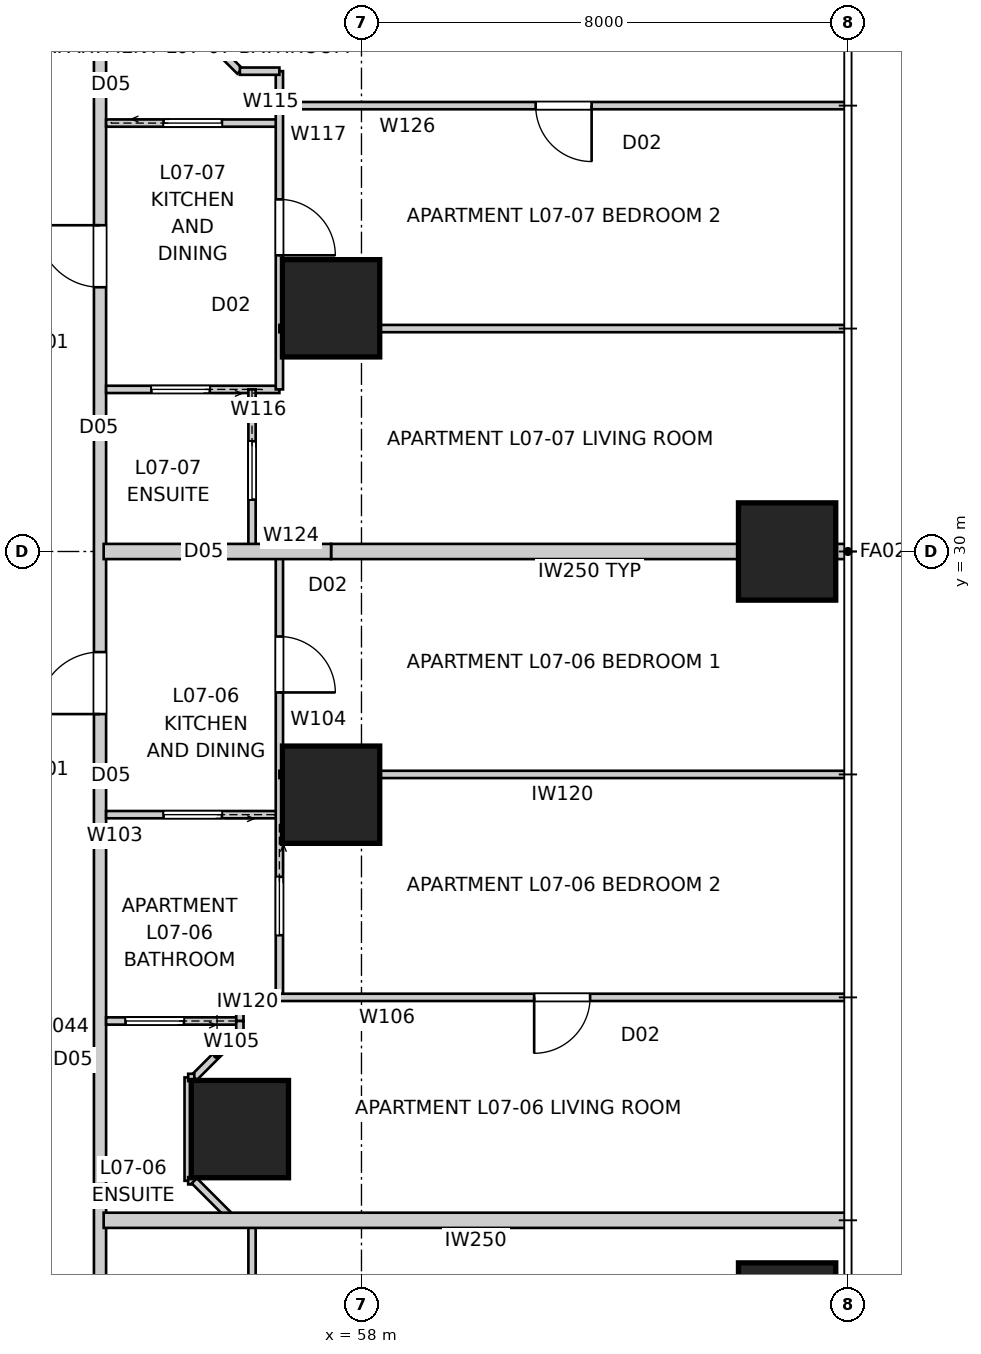
"""IFC4 building model, lengths in metres.
Left out: names, types, materials, properties, quantities, classifications, styles, units other than length and angle.
Written with IfcOpenShell. Run it as: python <this file> out.ifc"""

import sys

from ifc_helpers import new_model, si_unit, direction, frame, frame_2d, origin, origin_2d, place, context, subcontext, project, spatial, rectangle, extrude, element, fill, save


model = new_model("IFC4")
c1 = context("Model", 3, precision=1e-05, world=origin(), true_north=direction((0.0, 1.0)))
c2 = subcontext(c1, "Body", "Model", "MODEL_VIEW")
j1 = project(units=[si_unit("LENGTHUNIT", "METRE"), si_unit("PLANEANGLEUNIT", "RADIAN")], contexts=[c1])
p1 = place(None, origin())
s1 = spatial("IfcSite", under=j1, at=p1, CompositionType="ELEMENT")
p2 = place(p1, origin())
s2 = spatial("IfcBuilding", under=s1, at=p2, CompositionType="ELEMENT")
p3 = place(p2, frame((0.0, 0.0, 28.6)))
s3 = spatial("IfcBuildingStorey", under=s2, at=p3, CompositionType="ELEMENT", Elevation=28.6)
for number, where, z_axis, x_axis in (
    (1, (65.0, 17.5, 0.0), (0.0, 0.0, 1.0), (1.0, 0.0, 0.0)),
    (2, (65.0, 30.0, 0.0), (0.0, 0.0, 1.0), (1.0, 0.0, 0.0)),
    (3, (57.5, 26.0, 0.0), (0.0, 0.0, 1.0), (1.0, 0.0, 0.0)),
    (4, (57.5, 34.0, 0.0), (0.0, 0.0, 1.0), (1.0, 0.0, 0.0)),
    (5, (56.0, 20.5, 0.0), (0.0, 0.0, 1.0), (1.0, 0.0, 0.0)),
):
    element("IfcColumn", number, at=place(p3, frame(where, z_axis=z_axis, x_axis=x_axis)), inside=s3, PredefinedType="COLUMN", context=c2, shape_type="SweptSolid", body=[
        extrude(rectangle(XDim=1.6, YDim=1.6, at=origin_2d()), origin(), (0.0, 0.0, 1.0), 3.4),
    ])
p4 = place(p3, frame((53.7, 13.7, 0.0), z_axis=(0.0, 0.0, 1.0), x_axis=(0.0, 1.0, 0.0)))
e6 = element("IfcWall", 6, at=p4, inside=s3, PredefinedType="PARTITIONING", context=c2, shape_type="SweptSolid", body=[
    extrude(rectangle(XDim=32.6, YDim=0.2, at=frame_2d((16.3, 0.0))), origin(), (0.0, 0.0, 1.0), 3.25),
])
p5 = place(p4, frame((2.315, 0.0, 0.0)))
e7 = element("IfcOpeningElement", 7, at=p5, cuts=e6, PredefinedType="OPENING", context=c2, shape_type="SweptSolid", body=[
    extrude(rectangle(XDim=1.02, YDim=2.34, at=frame_2d((0.51, 1.17))), frame((0.0, 0.11, 0.0), z_axis=(0.0, -1.0, 0.0), x_axis=(1.0, 0.0, 0.0)), (0.0, 0.0, 1.0), 0.22),
])
p6 = place(p4, frame((29.265, 0.0, 0.0)))
e8 = element("IfcOpeningElement", 8, at=p6, cuts=e6, PredefinedType="OPENING", context=c2, shape_type="SweptSolid", body=[
    extrude(rectangle(XDim=1.02, YDim=2.34, at=frame_2d((0.51, 1.17))), frame((0.0, 0.11, 0.0), z_axis=(0.0, -1.0, 0.0), x_axis=(1.0, 0.0, 0.0)), (0.0, 0.0, 1.0), 0.22),
])
p7 = place(p4, frame((20.646, 0.0, 0.0)))
e9 = element("IfcOpeningElement", 9, at=p7, cuts=e6, PredefinedType="OPENING", context=c2, shape_type="SweptSolid", body=[
    extrude(rectangle(XDim=1.02, YDim=2.34, at=frame_2d((0.51, 1.17))), frame((0.0, 0.11, 0.0), z_axis=(0.0, -1.0, 0.0), x_axis=(1.0, 0.0, 0.0)), (0.0, 0.0, 1.0), 0.22),
])
p8 = place(p4, frame((13.626, 0.0, 0.0)))
e10 = element("IfcOpeningElement", 10, at=p8, cuts=e6, PredefinedType="OPENING", context=c2, shape_type="SweptSolid", body=[
    extrude(rectangle(XDim=1.02, YDim=2.34, at=frame_2d((0.51, 1.17))), frame((0.0, 0.11, 0.0), z_axis=(0.0, -1.0, 0.0), x_axis=(1.0, 0.0, 0.0)), (0.0, 0.0, 1.0), 0.22),
])
p9 = place(p3, frame((66.0, 19.0, 0.0), z_axis=(0.0, 0.0, 1.0), x_axis=(-1.0, 0.0, 0.0)))
e11 = element("IfcWall", 11, at=p9, inside=s3, PredefinedType="PARTITIONING", context=c2, shape_type="SweptSolid", body=[
    extrude(rectangle(XDim=12.24, YDim=0.25, at=frame_2d((6.12, 0.0))), origin(), (0.0, 0.0, 1.0), 3.25),
])
p10 = place(p3, frame((66.0, 30.0, 0.0), z_axis=(0.0, 0.0, 1.0), x_axis=(-1.0, 0.0, 0.0)))
e12 = element("IfcWall", 12, at=p10, inside=s3, PredefinedType="PARTITIONING", context=c2, shape_type="SweptSolid", body=[
    extrude(rectangle(XDim=8.5, YDim=0.25, at=frame_2d((4.25, 0.0))), origin(), (0.0, 0.0, 1.0), 3.25),
])
p11 = place(p3, frame((57.5, 30.0, 0.0), z_axis=(0.0, 0.0, 1.0), x_axis=(-1.0, 0.0, 0.0)))
e13 = element("IfcWall", 13, at=p11, inside=s3, PredefinedType="PARTITIONING", context=c2, shape_type="SweptSolid", body=[
    extrude(rectangle(XDim=3.74, YDim=0.25, at=frame_2d((1.87, 0.0))), origin(), (0.0, 0.0, 1.0), 2.796),
])
p12 = place(p3, frame((56.2, 19.0, 0.0), z_axis=(0.0, 0.0, 1.0), x_axis=(0.0, -1.0, 0.0)))
e14 = element("IfcWall", 14, at=p12, inside=s3, PredefinedType="PARTITIONING", context=c2, shape_type="SweptSolid", body=[
    extrude(rectangle(XDim=7.8, YDim=0.12, at=frame_2d((3.9, 0.0))), origin(), (0.0, 0.0, 1.0), 3.25),
])
p13 = place(p12, frame((2.24, 0.0, 0.0)))
e15 = element("IfcOpeningElement", 15, at=p13, cuts=e14, PredefinedType="OPENING", context=c2, shape_type="SweptSolid", body=[
    extrude(rectangle(XDim=0.92, YDim=2.34, at=frame_2d((0.46, 1.17))), frame((0.0, 0.07, 0.0), z_axis=(0.0, -1.0, 0.0), x_axis=(1.0, 0.0, 0.0)), (0.0, 0.0, 1.0), 0.14),
])
p14 = place(p3, frame((56.65, 25.672, 0.0), z_axis=(0.0, 0.0, 1.0), x_axis=(-1.0, 0.0, 0.0)))
e16 = element("IfcWall", 16, at=p14, inside=s3, PredefinedType="PARTITIONING", context=c2, shape_type="SweptSolid", body=[
    extrude(rectangle(XDim=2.85, YDim=0.12, at=frame_2d((1.425, 0.0))), origin(), (0.0, 0.0, 1.0), 3.25),
])
p15 = place(p14, frame((0.945, 0.0, 0.0)))
e17 = element("IfcOpeningElement", 17, at=p15, cuts=e16, PredefinedType="OPENING", context=c2, shape_type="SweptSolid", body=[
    extrude(rectangle(XDim=0.96, YDim=2.1, at=frame_2d((0.48, 1.05))), frame((0.0, 0.07, 0.0), z_axis=(0.0, -1.0, 0.0), x_axis=(1.0, 0.0, 0.0)), (0.0, 0.0, 1.0), 0.14),
])
p16 = place(p3, frame((56.65, 30.0, 0.0), z_axis=(0.0, 0.0, 1.0), x_axis=(0.0, -1.0, 0.0)))
e18 = element("IfcWall", 18, at=p16, inside=s3, PredefinedType="PARTITIONING", context=c2, shape_type="SweptSolid", body=[
    extrude(rectangle(XDim=7.333, YDim=0.12, at=frame_2d((3.667, 0.0))), origin(), (0.0, 0.0, 1.0), 2.55),
])
p17 = place(p16, frame((1.398, 0.0, 0.0)))
e19 = element("IfcOpeningElement", 19, at=p17, cuts=e18, PredefinedType="OPENING", context=c2, shape_type="SweptSolid", body=[
    extrude(rectangle(XDim=0.92, YDim=2.34, at=frame_2d((0.46, 1.17))), frame((0.0, 0.07, 0.0), z_axis=(0.0, -1.0, 0.0), x_axis=(1.0, 0.0, 0.0)), (0.0, 0.0, 1.0), 0.14),
])
p18 = place(p16, frame((5.351, 0.0, 0.0)))
e20 = element("IfcOpeningElement", 20, at=p18, cuts=e18, PredefinedType="OPENING", context=c2, shape_type="SweptSolid", body=[
    extrude(rectangle(XDim=0.96, YDim=2.1, at=frame_2d((0.48, 1.05))), frame((0.0, 0.07, 0.0), z_axis=(0.0, -1.0, 0.0), x_axis=(1.0, 0.0, 0.0)), (0.0, 0.0, 1.0), 0.14),
])
p19 = place(p3, frame((56.0, 22.278, 0.0), z_axis=(0.0, 0.0, 1.0), x_axis=(-1.0, 0.0, 0.0)))
e21 = element("IfcWall", 21, at=p19, inside=s3, PredefinedType="PARTITIONING", context=c2, shape_type="SweptSolid", body=[
    extrude(rectangle(XDim=2.2, YDim=0.12, at=frame_2d((1.1, 0.0))), origin(), (0.0, 0.0, 1.0), 3.25),
])
p20 = place(p19, frame((0.92, 0.0, 0.0)))
e22 = element("IfcOpeningElement", 22, at=p20, cuts=e21, PredefinedType="OPENING", context=c2, shape_type="SweptSolid", body=[
    extrude(rectangle(XDim=0.96, YDim=2.1, at=frame_2d((0.48, 1.05))), frame((0.0, 0.07, 0.0), z_axis=(0.0, -1.0, 0.0), x_axis=(1.0, 0.0, 0.0)), (0.0, 0.0, 1.0), 0.14),
])
p21 = place(p3, frame((65.96, 22.667, 0.0), z_axis=(0.0, 0.0, 1.0), x_axis=(-1.0, 0.0, 0.0)))
e23 = element("IfcWall", 23, at=p21, inside=s3, PredefinedType="PARTITIONING", context=c2, shape_type="SweptSolid", body=[
    extrude(rectangle(XDim=9.96, YDim=0.12, at=frame_2d((4.98, 0.0))), origin(), (0.0, 0.0, 1.0), 3.25),
])
p22 = place(p21, frame((4.2, 0.0, 0.0)))
e24 = element("IfcOpeningElement", 24, at=p22, cuts=e23, PredefinedType="OPENING", context=c2, shape_type="SweptSolid", body=[
    extrude(rectangle(XDim=0.92, YDim=2.34, at=frame_2d((0.46, 1.17))), frame((0.0, 0.07, 0.0), z_axis=(0.0, -1.0, 0.0), x_axis=(1.0, 0.0, 0.0)), (0.0, 0.0, 1.0), 0.14),
])
p23 = place(p3, frame((56.0, 22.667, 0.0), z_axis=(0.0, 0.0, 1.0), x_axis=(0.0, -1.0, 0.0)))
e25 = element("IfcWall", 25, at=p23, inside=s3, PredefinedType="PARTITIONING", context=c2, shape_type="SweptSolid", body=[
    extrude(rectangle(XDim=0.389, YDim=0.12, at=frame_2d((0.194, 0.0))), origin(), (0.0, 0.0, 1.0), 3.25),
])
p24 = place(p3, frame((56.0, 22.1, 0.0), z_axis=(0.0, 0.0, 1.0), x_axis=(-0.707106781187, -0.707106781187, 0.0)))
e26 = element("IfcWall", 26, at=p24, inside=s3, PredefinedType="PARTITIONING", context=c2, shape_type="SweptSolid", body=[
    extrude(rectangle(XDim=1.061, YDim=0.12, at=frame_2d((0.53, 0.0))), origin(), (0.0, 0.0, 1.0), 3.25),
])
p25 = place(p3, frame((55.15, 21.35, 0.0), z_axis=(0.0, 0.0, 1.0), x_axis=(0.0, -1.0, 0.0)))
e27 = element("IfcWall", 27, at=p25, inside=s3, PredefinedType="PARTITIONING", context=c2, shape_type="SweptSolid", body=[
    extrude(rectangle(XDim=1.7, YDim=0.12, at=frame_2d((0.85, 0.0))), origin(), (0.0, 0.0, 1.0), 3.25),
])
p26 = place(p3, frame((55.25, 19.65, 0.0), z_axis=(0.0, 0.0, 1.0), x_axis=(0.707106781187, -0.707106781187, 0.0)))
e28 = element("IfcWall", 28, at=p26, inside=s3, PredefinedType="PARTITIONING", context=c2, shape_type="SweptSolid", body=[
    extrude(rectangle(XDim=0.919, YDim=0.12, at=frame_2d((0.459, 0.0))), origin(), (0.0, 0.0, 1.0), 3.25),
])
p27 = place(p3, frame((65.96, 26.333, 0.0), z_axis=(0.0, 0.0, 1.0), x_axis=(-1.0, 0.0, 0.0)))
e29 = element("IfcWall", 29, at=p27, inside=s3, PredefinedType="PARTITIONING", context=c2, shape_type="SweptSolid", body=[
    extrude(rectangle(XDim=9.31, YDim=0.12, at=frame_2d((4.655, 0.0))), origin(), (0.0, 0.0, 1.0), 3.25),
])
p28 = place(p3, frame((53.8, 37.046, 0.0), z_axis=(0.0, 0.0, 1.0), x_axis=(1.0, 0.0, 0.0)))
e30 = element("IfcWall", 30, at=p28, inside=s3, PredefinedType="PARTITIONING", context=c2, shape_type="SweptSolid", body=[
    extrude(rectangle(XDim=2.85, YDim=0.12, at=frame_2d((1.425, 0.0))), origin(), (0.0, 0.0, 1.0), 3.25),
])
p29 = place(p28, frame((0.945, 0.0, 0.0)))
e31 = element("IfcOpeningElement", 31, at=p29, cuts=e30, PredefinedType="OPENING", context=c2, shape_type="SweptSolid", body=[
    extrude(rectangle(XDim=0.96, YDim=2.1, at=frame_2d((0.48, 1.05))), frame((0.0, 0.07, 0.0), z_axis=(0.0, -1.0, 0.0), x_axis=(1.0, 0.0, 0.0)), (0.0, 0.0, 1.0), 0.14),
])
p30 = place(p3, frame((56.65, 32.666, 0.0), z_axis=(0.0, 0.0, 1.0), x_axis=(-1.0, 0.0, 0.0)))
e32 = element("IfcWall", 32, at=p30, inside=s3, PredefinedType="PARTITIONING", context=c2, shape_type="SweptSolid", body=[
    extrude(rectangle(XDim=2.85, YDim=0.12, at=frame_2d((1.425, 0.0))), origin(), (0.0, 0.0, 1.0), 3.25),
])
p31 = place(p30, frame((1.145, 0.0, 0.0)))
e33 = element("IfcOpeningElement", 33, at=p31, cuts=e32, PredefinedType="OPENING", context=c2, shape_type="SweptSolid", body=[
    extrude(rectangle(XDim=0.96, YDim=2.1, at=frame_2d((0.48, 1.05))), frame((0.0, 0.07, 0.0), z_axis=(0.0, -1.0, 0.0), x_axis=(1.0, 0.0, 0.0)), (0.0, 0.0, 1.0), 0.14),
])
p32 = place(p3, frame((56.65, 37.9, 0.0), z_axis=(0.0, 0.0, 1.0), x_axis=(0.0, -1.0, 0.0)))
e34 = element("IfcWall", 34, at=p32, inside=s3, PredefinedType="PARTITIONING", context=c2, shape_type="SweptSolid", body=[
    extrude(rectangle(XDim=5.234, YDim=0.12, at=frame_2d((2.617, 0.0))), origin(), (0.0, 0.0, 1.0), 2.55),
])
p33 = place(p32, frame((2.109, 0.0, 0.0)))
e35 = element("IfcOpeningElement", 35, at=p33, cuts=e34, PredefinedType="OPENING", context=c2, shape_type="SweptSolid", body=[
    extrude(rectangle(XDim=0.92, YDim=2.34, at=frame_2d((0.46, 1.17))), frame((0.0, 0.07, 0.0), z_axis=(0.0, -1.0, 0.0), x_axis=(1.0, 0.0, 0.0)), (0.0, 0.0, 1.0), 0.14),
])
p34 = place(p3, frame((55.25, 38.65, 0.0), z_axis=(0.0, 0.0, 1.0), x_axis=(0.707106781187, -0.707106781187, 0.0)))
e36 = element("IfcWall", 36, at=p34, inside=s3, PredefinedType="PARTITIONING", context=c2, shape_type="SweptSolid", body=[
    extrude(rectangle(XDim=1.061, YDim=0.12, at=frame_2d((0.53, 0.0))), origin(), (0.0, 0.0, 1.0), 3.25),
])
p35 = place(p3, frame((56.0, 37.9, 0.0), z_axis=(0.0, 0.0, 1.0), x_axis=(1.0, 0.0, 0.0)))
e37 = element("IfcWall", 37, at=p35, inside=s3, PredefinedType="PARTITIONING", context=c2, shape_type="SweptSolid", body=[
    extrude(rectangle(XDim=0.65, YDim=0.12, at=frame_2d((0.325, 0.0))), origin(), (0.0, 0.0, 1.0), 3.25),
])
p36 = place(p3, frame((56.2, 32.666, 0.0), z_axis=(0.0, 0.0, 1.0), x_axis=(0.0, -1.0, 0.0)))
e38 = element("IfcWall", 38, at=p36, inside=s3, PredefinedType="PARTITIONING", context=c2, shape_type="SweptSolid", body=[
    extrude(rectangle(XDim=2.666, YDim=0.12, at=frame_2d((1.333, 0.0))), origin(), (0.0, 0.0, 1.0), 3.25),
])
p37 = place(p36, frame((0.853, 0.0, 0.0)))
e39 = element("IfcOpeningElement", 39, at=p37, cuts=e38, PredefinedType="OPENING", context=c2, shape_type="SweptSolid", body=[
    extrude(rectangle(XDim=0.96, YDim=2.1, at=frame_2d((0.48, 1.05))), frame((0.0, 0.07, 0.0), z_axis=(0.0, -1.0, 0.0), x_axis=(1.0, 0.0, 0.0)), (0.0, 0.0, 1.0), 0.14),
])
p38 = place(p3, frame((56.65, 33.667, 0.0), z_axis=(0.0, 0.0, 1.0), x_axis=(1.0, 0.0, 0.0)))
e40 = element("IfcWall", 40, at=p38, inside=s3, PredefinedType="PARTITIONING", context=c2, shape_type="SweptSolid", body=[
    extrude(rectangle(XDim=9.31, YDim=0.12, at=frame_2d((4.655, 0.0))), origin(), (0.0, 0.0, 1.0), 3.25),
])
p39 = place(p3, frame((65.96, 37.333, 0.0), z_axis=(0.0, 0.0, 1.0), x_axis=(-1.0, 0.0, 0.0)))
e41 = element("IfcWall", 41, at=p39, inside=s3, PredefinedType="PARTITIONING", context=c2, shape_type="SweptSolid", body=[
    extrude(rectangle(XDim=9.31, YDim=0.12, at=frame_2d((4.655, 0.0))), origin(), (0.0, 0.0, 1.0), 3.25),
])
p40 = place(p39, frame((4.175, 0.0, 0.0)))
e42 = element("IfcOpeningElement", 42, at=p40, cuts=e41, PredefinedType="OPENING", context=c2, shape_type="SweptSolid", body=[
    extrude(rectangle(XDim=0.92, YDim=2.34, at=frame_2d((0.46, 1.17))), frame((0.0, 0.07, 0.0), z_axis=(0.0, -1.0, 0.0), x_axis=(1.0, 0.0, 0.0)), (0.0, 0.0, 1.0), 0.14),
])
p41 = place(p3, frame((56.0, 22.1, 0.0), z_axis=(0.0, 0.0, 1.0), x_axis=(0.0, 1.0, 0.0)))
e43 = element("IfcWall", 43, at=p41, inside=s3, PredefinedType="PARTITIONING", context=c2, shape_type="SweptSolid", body=[
    extrude(rectangle(XDim=0.178, YDim=0.12, at=frame_2d((0.089, 0.0))), origin(), (0.0, 0.0, 1.0), 3.25),
])
for number, where, z_axis, x_axis in (
    (44, (55.15, 21.35, 0.0), (0.0, 0.0, 1.0), (1.0, 0.0, 0.0)),
    (45, (55.15, 19.65, 0.0), (0.0, 0.0, 1.0), (1.0, 0.0, 0.0)),
):
    element("IfcWall", number, at=place(p3, frame(where, z_axis=z_axis, x_axis=x_axis)), inside=s3, PredefinedType="PARTITIONING", context=c2, shape_type="SweptSolid", body=[
        extrude(rectangle(XDim=0.1, YDim=0.12, at=frame_2d((0.05, 0.0))), origin(), (0.0, 0.0, 1.0), 3.25),
    ])
p42 = place(p7, origin())
e46 = element("IfcDoor", 46, at=p42, inside=s3, OperationType="SINGLE_SWING_RIGHT", PredefinedType="DOOR", context=c2, shape_type="SweptSolid", body=[
    extrude(rectangle(XDim=1.02, YDim=2.34, at=frame_2d((0.51, 1.17))), frame((0.0, 0.025, 0.0), z_axis=(0.0, -1.0, 0.0), x_axis=(1.0, 0.0, 0.0)), (0.0, 0.0, 1.0), 0.05),
])
fill(e9, e46)
p43 = place(p8, origin())
e47 = element("IfcDoor", 47, at=p43, inside=s3, OperationType="SINGLE_SWING_LEFT", PredefinedType="DOOR", context=c2, shape_type="SweptSolid", body=[
    extrude(rectangle(XDim=1.02, YDim=2.34, at=frame_2d((0.51, 1.17))), frame((0.0, 0.025, 0.0), z_axis=(0.0, -1.0, 0.0), x_axis=(1.0, 0.0, 0.0)), (0.0, 0.0, 1.0), 0.05),
])
fill(e10, e47)
p44 = place(p33, origin())
e48 = element("IfcDoor", 48, at=p44, inside=s3, OperationType="SINGLE_SWING_RIGHT", PredefinedType="DOOR", context=c2, shape_type="SweptSolid", body=[
    extrude(rectangle(XDim=0.92, YDim=2.34, at=frame_2d((0.46, 1.17))), frame((0.0, 0.025, 0.0), z_axis=(0.0, -1.0, 0.0), x_axis=(1.0, 0.0, 0.0)), (0.0, 0.0, 1.0), 0.05),
])
fill(e35, e48)
p45 = place(p29, origin())
e49 = element("IfcDoor", 49, at=p45, inside=s3, OperationType="SLIDING_TO_LEFT", PredefinedType="DOOR", context=c2, shape_type="SweptSolid", body=[
    extrude(rectangle(XDim=0.96, YDim=2.1, at=frame_2d((0.48, 1.05))), frame((0.0, 0.025, 0.0), z_axis=(0.0, -1.0, 0.0), x_axis=(1.0, 0.0, 0.0)), (0.0, 0.0, 1.0), 0.05),
])
fill(e31, e49)
p46 = place(p31, origin())
e50 = element("IfcDoor", 50, at=p46, inside=s3, OperationType="SLIDING_TO_LEFT", PredefinedType="DOOR", context=c2, shape_type="SweptSolid", body=[
    extrude(rectangle(XDim=0.96, YDim=2.1, at=frame_2d((0.48, 1.05))), frame((0.0, 0.025, 0.0), z_axis=(0.0, -1.0, 0.0), x_axis=(1.0, 0.0, 0.0)), (0.0, 0.0, 1.0), 0.05),
])
fill(e33, e50)
p47 = place(p17, origin())
e51 = element("IfcDoor", 51, at=p47, inside=s3, OperationType="SINGLE_SWING_RIGHT", PredefinedType="DOOR", context=c2, shape_type="SweptSolid", body=[
    extrude(rectangle(XDim=0.92, YDim=2.34, at=frame_2d((0.46, 1.17))), frame((0.0, 0.025, 0.0), z_axis=(0.0, -1.0, 0.0), x_axis=(1.0, 0.0, 0.0)), (0.0, 0.0, 1.0), 0.05),
])
fill(e19, e51)
p48 = place(p15, origin())
e52 = element("IfcDoor", 52, at=p48, inside=s3, OperationType="SLIDING_TO_LEFT", PredefinedType="DOOR", context=c2, shape_type="SweptSolid", body=[
    extrude(rectangle(XDim=0.96, YDim=2.1, at=frame_2d((0.48, 1.05))), frame((0.0, 0.025, 0.0), z_axis=(0.0, -1.0, 0.0), x_axis=(1.0, 0.0, 0.0)), (0.0, 0.0, 1.0), 0.05),
])
fill(e17, e52)
p49 = place(p37, origin())
e53 = element("IfcDoor", 53, at=p49, inside=s3, OperationType="SLIDING_TO_LEFT", PredefinedType="DOOR", context=c2, shape_type="SweptSolid", body=[
    extrude(rectangle(XDim=0.96, YDim=2.1, at=frame_2d((0.48, 1.05))), frame((0.0, 0.025, 0.0), z_axis=(0.0, -1.0, 0.0), x_axis=(1.0, 0.0, 0.0)), (0.0, 0.0, 1.0), 0.05),
])
fill(e39, e53)
p50 = place(p18, origin())
e54 = element("IfcDoor", 54, at=p50, inside=s3, OperationType="SLIDING_TO_LEFT", PredefinedType="DOOR", context=c2, shape_type="SweptSolid", body=[
    extrude(rectangle(XDim=0.96, YDim=2.1, at=frame_2d((0.48, 1.05))), frame((0.0, 0.025, 0.0), z_axis=(0.0, -1.0, 0.0), x_axis=(1.0, 0.0, 0.0)), (0.0, 0.0, 1.0), 0.05),
])
fill(e20, e54)
p51 = place(p20, origin())
e55 = element("IfcDoor", 55, at=p51, inside=s3, OperationType="SLIDING_TO_LEFT", PredefinedType="DOOR", context=c2, shape_type="SweptSolid", body=[
    extrude(rectangle(XDim=0.96, YDim=2.1, at=frame_2d((0.48, 1.05))), frame((0.0, 0.025, 0.0), z_axis=(0.0, -1.0, 0.0), x_axis=(1.0, 0.0, 0.0)), (0.0, 0.0, 1.0), 0.05),
])
fill(e22, e55)
p52 = place(p40, origin())
e56 = element("IfcDoor", 56, at=p52, inside=s3, OperationType="SINGLE_SWING_LEFT", PredefinedType="DOOR", context=c2, shape_type="SweptSolid", body=[
    extrude(rectangle(XDim=0.92, YDim=2.34, at=frame_2d((0.46, 1.17))), frame((0.0, 0.025, 0.0), z_axis=(0.0, -1.0, 0.0), x_axis=(1.0, 0.0, 0.0)), (0.0, 0.0, 1.0), 0.05),
])
fill(e42, e56)
p53 = place(p22, origin())
e57 = element("IfcDoor", 57, at=p53, inside=s3, OperationType="SINGLE_SWING_RIGHT", PredefinedType="DOOR", context=c2, shape_type="SweptSolid", body=[
    extrude(rectangle(XDim=0.92, YDim=2.34, at=frame_2d((0.46, 1.17))), frame((0.0, 0.025, 0.0), z_axis=(0.0, -1.0, 0.0), x_axis=(1.0, 0.0, 0.0)), (0.0, 0.0, 1.0), 0.05),
])
fill(e24, e57)
save(model, sys.argv[1])
